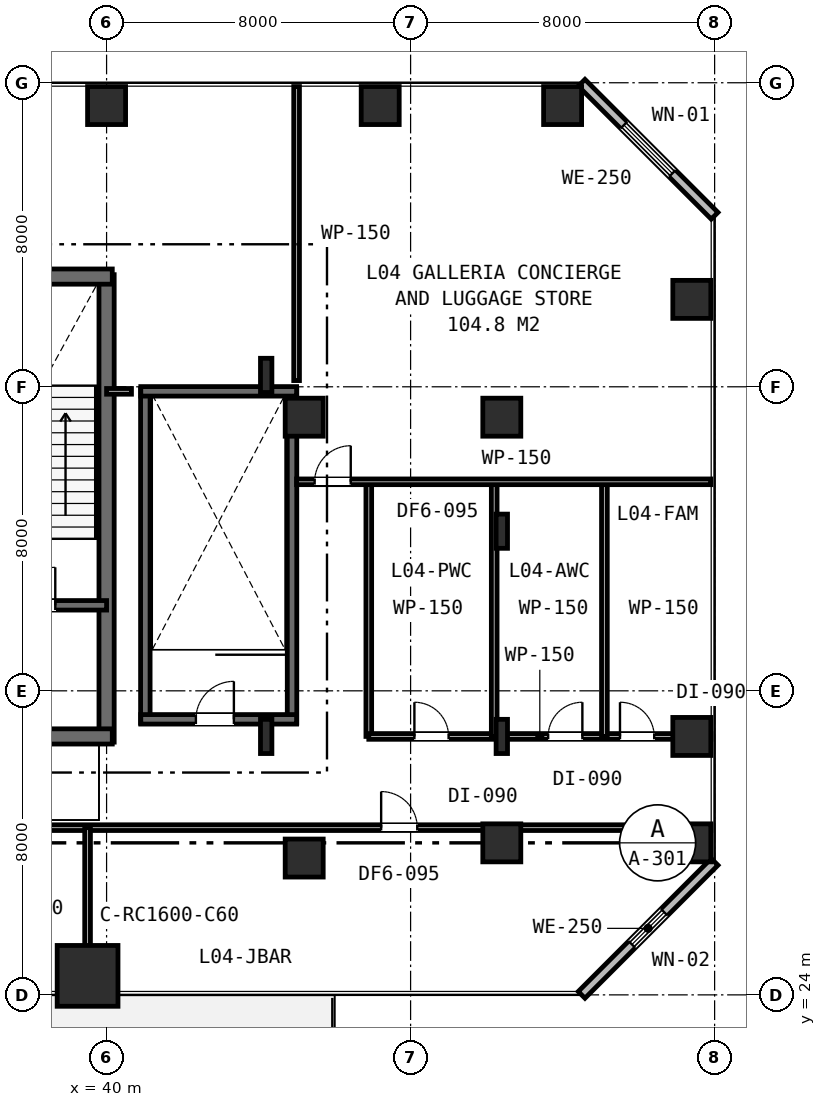
"""IFC4 building model, lengths in metres.
Left out: names, types, materials, properties, quantities, classifications, styles, units other than length and angle.
Written with IfcOpenShell. Run it as: python <this file> out.ifc"""

import sys

from ifc_helpers import new_model, si_unit, direction, frame, frame_2d, origin, origin_2d, place, context, subcontext, project, spatial, rectangle, i_section, extrude, element, fill, save


model = new_model("IFC4")
c1 = context("Model", 3, precision=1e-05, world=origin(), true_north=direction((0.0, 1.0)))
c2 = subcontext(c1, "Body", "Model", "MODEL_VIEW")
j1 = project(units=[si_unit("LENGTHUNIT", "METRE"), si_unit("PLANEANGLEUNIT", "RADIAN")], contexts=[c1])
p1 = place(None, origin())
s1 = spatial("IfcSite", under=j1, at=p1, CompositionType="ELEMENT")
p2 = place(p1, origin())
s2 = spatial("IfcBuilding", under=s1, at=p2, CompositionType="ELEMENT")
p3 = place(p2, frame((0.0, 0.0, 21.3)))
s3 = spatial("IfcBuildingStorey", under=s2, at=p3, CompositionType="ELEMENT", Elevation=21.3)
p4 = place(p3, frame((40.0, 30.65, 0.0), z_axis=(0.0, 0.0, 1.0), x_axis=(0.0, 1.0, 0.0)))
e1 = element("IfcWall", 1, at=p4, inside=s3, PredefinedType="SHEAR", context=c2, shape_type="SweptSolid", body=[
    extrude(rectangle(XDim=12.3, YDim=0.4, at=frame_2d((6.15, 0.0))), origin(), (0.0, 0.0, 1.0), 4.5),
])
p5 = place(p3, frame((15.85, 42.9, 0.0), z_axis=(0.0, 0.0, 1.0), x_axis=(1.0, 0.0, 0.0)))
e2 = element("IfcWall", 2, at=p5, inside=s3, PredefinedType="SHEAR", context=c2, shape_type="SweptSolid", body=[
    extrude(rectangle(XDim=24.3, YDim=0.4, at=frame_2d((12.15, 0.0))), origin(), (0.0, 0.0, 1.0), 4.5),
])
p6 = place(p3, frame((28.95, 30.8, 0.0), z_axis=(0.0, 0.0, 1.0), x_axis=(1.0, 0.0, 0.0)))
e3 = element("IfcWall", 3, at=p6, inside=s3, PredefinedType="SHEAR", context=c2, shape_type="SweptSolid", body=[
    extrude(rectangle(XDim=11.2, YDim=0.4, at=frame_2d((5.6, 0.0))), origin(), (0.0, 0.0, 1.0), 4.5),
])
p7 = place(p6, frame((7.65, 0.0, 0.0)))
e4 = element("IfcOpeningElement", 4, at=p7, cuts=e3, PredefinedType="OPENING", context=c2, shape_type="SweptSolid", body=[
    extrude(rectangle(XDim=1.1, YDim=2.15, at=frame_2d((0.55, 1.075))), frame((0.0, 0.21, 0.0), z_axis=(0.0, -1.0, 0.0), x_axis=(1.0, 0.0, 0.0)), (0.0, 0.0, 1.0), 0.42),
])
p8 = place(p3, frame((33.95, 34.25, 0.0), z_axis=(0.0, 0.0, 1.0), x_axis=(1.0, 0.0, 0.0)))
e5 = element("IfcWall", 5, at=p8, inside=s3, PredefinedType="SHEAR", context=c2, shape_type="SweptSolid", body=[
    extrude(rectangle(XDim=6.05, YDim=0.25, at=frame_2d((3.025, 0.0))), origin(), (0.0, 0.0, 1.0), 4.5),
])
p9 = place(p8, frame((3.7, 0.0, 0.0)))
e6 = element("IfcOpeningElement", 6, at=p9, cuts=e5, PredefinedType="OPENING", context=c2, shape_type="SweptSolid", body=[
    extrude(rectangle(XDim=1.0, YDim=2.15, at=frame_2d((0.5, 1.075))), frame((0.0, 0.135, 0.0), z_axis=(0.0, -1.0, 0.0), x_axis=(1.0, 0.0, 0.0)), (0.0, 0.0, 1.0), 0.27),
])
p10 = place(p8, frame((0.55, 0.0, 0.0)))
e7 = element("IfcOpeningElement", 7, at=p10, cuts=e5, PredefinedType="OPENING", context=c2, shape_type="SweptSolid", body=[
    extrude(rectangle(XDim=1.1, YDim=2.15, at=frame_2d((0.55, 1.075))), frame((0.0, 0.135, 0.0), z_axis=(0.0, -1.0, 0.0), x_axis=(1.0, 0.0, 0.0)), (0.0, 0.0, 1.0), 0.27),
])
for number, where, z_axis, x_axis in (
    (8, (41.02, 31.15, 0.0), (0.0, 0.0, 1.0), (0.0, 1.0, 0.0)),
    (9, (44.88, 31.15, 0.0), (0.0, 0.0, 1.0), (0.0, 1.0, 0.0)),
):
    element("IfcWall", number, at=place(p3, frame(where, z_axis=z_axis, x_axis=x_axis)), inside=s3, PredefinedType="SHEAR", context=c2, shape_type="SweptSolid", body=[
        extrude(rectangle(XDim=8.8, YDim=0.25, at=frame_2d((4.4, 0.0))), origin(), (0.0, 0.0, 1.0), 4.5),
    ])
p11 = place(p3, frame((40.9, 39.88, 0.0), z_axis=(0.0, 0.0, 1.0), x_axis=(1.0, 0.0, 0.0)))
e10 = element("IfcWall", 10, at=p11, inside=s3, PredefinedType="SHEAR", context=c2, shape_type="SweptSolid", body=[
    extrude(rectangle(XDim=4.1, YDim=0.25, at=frame_2d((2.05, 0.0))), origin(), (0.0, 0.0, 1.0), 4.5),
])
p12 = place(p3, frame((40.9, 31.25, 0.0), z_axis=(0.0, 0.0, 1.0), x_axis=(1.0, 0.0, 0.0)))
e11 = element("IfcWall", 11, at=p12, inside=s3, PredefinedType="SHEAR", context=c2, shape_type="SweptSolid", body=[
    extrude(rectangle(XDim=4.1, YDim=0.25, at=frame_2d((2.05, 0.0))), origin(), (0.0, 0.0, 1.0), 4.5),
])
p13 = place(p12, frame((1.45, 0.0, 0.0)))
e12 = element("IfcOpeningElement", 12, at=p13, cuts=e11, PredefinedType="OPENING", context=c2, shape_type="SweptSolid", body=[
    extrude(rectangle(XDim=1.0, YDim=2.15, at=frame_2d((0.5, 1.075))), frame((0.0, 0.135, 0.0), z_axis=(0.0, -1.0, 0.0), x_axis=(1.0, 0.0, 0.0)), (0.0, 0.0, 1.0), 0.27),
])
p14 = place(p3, frame((39.5, 24.5, 0.0), z_axis=(0.0, 0.0, 1.0), x_axis=(1.0, 0.0, 0.0)))
e13 = element("IfcColumn", 13, at=p14, inside=s3, PredefinedType="COLUMN", context=c2, shape_type="SweptSolid", body=[
    extrude(rectangle(XDim=1.6, YDim=1.6, at=origin_2d()), origin(), (0.0, 0.0, 1.0), 4.5),
])
for number, where, z_axis, x_axis in (
    (14, (45.2, 27.6, 0.0), (0.0, 0.0, 1.0), (1.0, 0.0, 0.0)),
    (15, (45.2, 39.2, 0.0), (0.0, 0.0, 1.0), (1.0, 0.0, 0.0)),
    (16, (40.0, 47.4, 0.0), (0.0, 0.0, 1.0), (1.0, 0.0, 0.0)),
    (17, (47.2, 47.4, 0.0), (0.0, 0.0, 1.0), (1.0, 0.0, 0.0)),
    (18, (50.4, 28.0, 0.0), (0.0, 0.0, 1.0), (1.0, 0.0, 0.0)),
    (19, (50.4, 39.2, 0.0), (0.0, 0.0, 1.0), (1.0, 0.0, 0.0)),
    (20, (55.4, 28.0, 0.0), (0.0, 0.0, 1.0), (1.0, 0.0, 0.0)),
    (21, (55.4, 30.8, 0.0), (0.0, 0.0, 1.0), (1.0, 0.0, 0.0)),
    (22, (55.4, 42.3, 0.0), (0.0, 0.0, 1.0), (1.0, 0.0, 0.0)),
    (23, (52.0, 47.4, 0.0), (0.0, 0.0, 1.0), (1.0, 0.0, 0.0)),
):
    element("IfcColumn", number, at=place(p3, frame(where, z_axis=z_axis, x_axis=x_axis)), inside=s3, PredefinedType="COLUMN", context=c2, shape_type="SweptSolid", body=[
        extrude(rectangle(XDim=1.0, YDim=1.0, at=origin_2d()), origin(), (0.0, 0.0, 1.0), 4.5),
    ])
for number, where, z_axis, x_axis in (
    (24, (44.2, 30.8, 0.0), (0.0, 0.0, 1.0), (1.0, 0.0, 0.0)),
    (25, (44.2, 40.3, 0.0), (0.0, 0.0, 1.0), (1.0, 0.0, 0.0)),
    (26, (50.4, 30.8, 0.0), (0.0, 0.0, 1.0), (1.0, 0.0, 0.0)),
    (27, (50.4, 36.2, 0.0), (0.0, 0.0, 1.0), (1.0, 0.0, 0.0)),
):
    element("IfcColumn", number, at=place(p3, frame(where, z_axis=z_axis, x_axis=x_axis)), inside=s3, PredefinedType="COLUMN", context=c2, shape_type="SweptSolid", body=[
        extrude(i_section(OverallWidth=0.3, OverallDepth=0.9, WebThickness=0.018, FlangeThickness=0.035, FilletRadius=0.03, at=origin_2d()), origin(), (0.0, 0.0, 1.0), 4.5),
    ])
p15 = place(p3, frame((52.5, 24.0, 0.0), z_axis=(0.0, 0.0, 1.0), x_axis=(0.707106781187, 0.707106781187, 0.0)))
e28 = element("IfcWall", 28, at=p15, inside=s3, PredefinedType="STANDARD", context=c2, shape_type="SweptSolid", body=[
    extrude(rectangle(XDim=4.95, YDim=0.25, at=frame_2d((2.475, 0.0))), origin(), (0.0, 0.0, 1.0), 4.23),
])
p16 = place(p15, frame((1.875, 0.0, 0.85)))
e29 = element("IfcOpeningElement", 29, at=p16, cuts=e28, PredefinedType="OPENING", context=c2, shape_type="SweptSolid", body=[
    extrude(rectangle(XDim=1.2, YDim=1.6, at=frame_2d((0.6, 0.8))), frame((0.0, 0.135, 0.0), z_axis=(0.0, -1.0, 0.0), x_axis=(1.0, 0.0, 0.0)), (0.0, 0.0, 1.0), 0.27),
])
p17 = place(p3, frame((56.0, 44.5, 0.0), z_axis=(0.0, 0.0, 1.0), x_axis=(-0.707106781187, 0.707106781187, 0.0)))
e30 = element("IfcWall", 30, at=p17, inside=s3, PredefinedType="STANDARD", context=c2, shape_type="SweptSolid", body=[
    extrude(rectangle(XDim=4.95, YDim=0.25, at=frame_2d((2.475, 0.0))), origin(), (0.0, 0.0, 1.0), 4.23),
])
p18 = place(p17, frame((1.575, 0.0, 0.75)))
e31 = element("IfcOpeningElement", 31, at=p18, cuts=e30, PredefinedType="OPENING", context=c2, shape_type="SweptSolid", body=[
    extrude(rectangle(XDim=1.8, YDim=1.85, at=frame_2d((0.9, 0.925))), frame((0.0, 0.135, 0.0), z_axis=(0.0, -1.0, 0.0), x_axis=(1.0, 0.0, 0.0)), (0.0, 0.0, 1.0), 0.27),
])
p19 = place(p3, frame((46.9, 30.8, 0.0), z_axis=(0.0, 0.0, 1.0), x_axis=(0.0, 1.0, 0.0)))
e32 = element("IfcWall", 32, at=p19, inside=s3, PredefinedType="PARTITIONING", context=c2, shape_type="SweptSolid", body=[
    extrude(rectangle(XDim=6.7, YDim=0.15, at=frame_2d((3.35, 0.0))), origin(), (0.0, 0.0, 1.0), 3.58),
])
p20 = place(p3, frame((46.9, 30.8, 0.0), z_axis=(0.0, 0.0, 1.0), x_axis=(1.0, 0.0, 0.0)))
e33 = element("IfcWall", 33, at=p20, inside=s3, PredefinedType="PARTITIONING", context=c2, shape_type="SweptSolid", body=[
    extrude(rectangle(XDim=9.0, YDim=0.15, at=frame_2d((4.5, 0.0))), origin(), (0.0, 0.0, 1.0), 3.58),
])
p21 = place(p20, frame((1.2, 0.0, 0.0)))
e34 = element("IfcOpeningElement", 34, at=p21, cuts=e33, PredefinedType="OPENING", context=c2, shape_type="SweptSolid", body=[
    extrude(rectangle(XDim=0.9, YDim=2.15, at=frame_2d((0.45, 1.075))), frame((0.0, 0.085, 0.0), z_axis=(0.0, -1.0, 0.0), x_axis=(1.0, 0.0, 0.0)), (0.0, 0.0, 1.0), 0.17),
])
p22 = place(p20, frame((4.72, 0.0, 0.0)))
e35 = element("IfcOpeningElement", 35, at=p22, cuts=e33, PredefinedType="OPENING", context=c2, shape_type="SweptSolid", body=[
    extrude(rectangle(XDim=0.9, YDim=2.15, at=frame_2d((0.45, 1.075))), frame((0.0, 0.085, 0.0), z_axis=(0.0, -1.0, 0.0), x_axis=(1.0, 0.0, 0.0)), (0.0, 0.0, 1.0), 0.17),
])
p23 = place(p20, frame((6.61, 0.0, 0.0)))
e36 = element("IfcOpeningElement", 36, at=p23, cuts=e33, PredefinedType="OPENING", context=c2, shape_type="SweptSolid", body=[
    extrude(rectangle(XDim=0.9, YDim=2.15, at=frame_2d((0.45, 1.075))), frame((0.0, 0.085, 0.0), z_axis=(0.0, -1.0, 0.0), x_axis=(1.0, 0.0, 0.0)), (0.0, 0.0, 1.0), 0.17),
])
for number, where, z_axis, x_axis in (
    (37, (50.2, 30.8, 0.0), (0.0, 0.0, 1.0), (0.0, 1.0, 0.0)),
    (38, (53.1, 30.8, 0.0), (0.0, 0.0, 1.0), (0.0, 1.0, 0.0)),
):
    element("IfcWall", number, at=place(p3, frame(where, z_axis=z_axis, x_axis=x_axis)), inside=s3, PredefinedType="PARTITIONING", context=c2, shape_type="SweptSolid", body=[
        extrude(rectangle(XDim=6.7, YDim=0.15, at=frame_2d((3.35, 0.0))), origin(), (0.0, 0.0, 1.0), 3.58),
    ])
p24 = place(p3, frame((45.0, 37.5, 0.0), z_axis=(0.0, 0.0, 1.0), x_axis=(1.0, 0.0, 0.0)))
e39 = element("IfcWall", 39, at=p24, inside=s3, PredefinedType="PARTITIONING", context=c2, shape_type="SweptSolid", body=[
    extrude(rectangle(XDim=10.9, YDim=0.15, at=frame_2d((5.45, 0.0))), origin(), (0.0, 0.0, 1.0), 3.58),
])
p25 = place(p24, frame((0.475, 0.0, 0.0)))
e40 = element("IfcOpeningElement", 40, at=p25, cuts=e39, PredefinedType="OPENING", context=c2, shape_type="SweptSolid", body=[
    extrude(rectangle(XDim=0.95, YDim=2.15, at=frame_2d((0.475, 1.075))), frame((0.0, 0.085, 0.0), z_axis=(0.0, -1.0, 0.0), x_axis=(1.0, 0.0, 0.0)), (0.0, 0.0, 1.0), 0.17),
])
p26 = place(p3, frame((45.0, 40.163, 0.0), z_axis=(0.0, 0.0, 1.0), x_axis=(0.0, 1.0, 0.0)))
e41 = element("IfcWall", 41, at=p26, inside=s3, PredefinedType="PARTITIONING", context=c2, shape_type="SweptSolid", body=[
    extrude(rectangle(XDim=7.737, YDim=0.15, at=frame_2d((3.868, 0.0))), origin(), (0.0, 0.0, 1.0), 3.77),
])
p27 = place(p3, frame((40.0, 39.88, 0.0), z_axis=(0.0, 0.0, 1.0), x_axis=(1.0, 0.0, 0.0)))
e42 = element("IfcWall", 42, at=p27, inside=s3, PredefinedType="PARTITIONING", context=c2, shape_type="SweptSolid", body=[
    extrude(rectangle(XDim=0.655, YDim=0.15, at=frame_2d((0.328, 0.0))), origin(), (0.0, 0.0, 1.0), 4.23),
])
p28 = place(p3, frame((13.7, 28.4, 0.0), z_axis=(0.0, 0.0, 1.0), x_axis=(1.0, 0.0, 0.0)))
e43 = element("IfcWall", 43, at=p28, inside=s3, PredefinedType="PARTITIONING", context=c2, shape_type="SweptSolid", body=[
    extrude(rectangle(XDim=42.2, YDim=0.15, at=frame_2d((21.1, 0.0))), origin(), (0.0, 0.0, 1.0), 3.58),
])
p29 = place(p28, frame((17.15, 0.0, 0.0)))
e44 = element("IfcOpeningElement", 44, at=p29, cuts=e43, PredefinedType="OPENING", context=c2, shape_type="SweptSolid", body=[
    extrude(rectangle(XDim=1.8, YDim=2.15, at=frame_2d((0.9, 1.075))), frame((0.0, 0.085, 0.0), z_axis=(0.0, -1.0, 0.0), x_axis=(1.0, 0.0, 0.0)), (0.0, 0.0, 1.0), 0.17),
])
p30 = place(p28, frame((33.525, 0.0, 0.0)))
e45 = element("IfcOpeningElement", 45, at=p30, cuts=e43, PredefinedType="OPENING", context=c2, shape_type="SweptSolid", body=[
    extrude(rectangle(XDim=0.95, YDim=2.15, at=frame_2d((0.475, 1.075))), frame((0.0, 0.085, 0.0), z_axis=(0.0, -1.0, 0.0), x_axis=(1.0, 0.0, 0.0)), (0.0, 0.0, 1.0), 0.17),
])
p31 = place(p3, frame((39.5, 24.1, 0.0), z_axis=(0.0, 0.0, 1.0), x_axis=(0.0, 1.0, 0.0)))
e46 = element("IfcWall", 46, at=p31, inside=s3, PredefinedType="PARTITIONING", context=c2, shape_type="SweptSolid", body=[
    extrude(rectangle(XDim=4.3, YDim=0.15, at=frame_2d((2.15, 0.0))), origin(), (0.0, 0.0, 1.0), 3.58),
])
p32 = place(p16, origin())
e47 = element("IfcWindow", 47, at=p32, inside=s3, PartitioningType="SINGLE_PANEL", PredefinedType="WINDOW", context=c2, shape_type="SweptSolid", body=[
    extrude(rectangle(XDim=1.2, YDim=1.6, at=frame_2d((0.6, 0.8))), frame((0.0, 0.03, 0.0), z_axis=(0.0, -1.0, 0.0), x_axis=(1.0, 0.0, 0.0)), (0.0, 0.0, 1.0), 0.06),
])
fill(e29, e47)
p33 = place(p18, origin())
e48 = element("IfcWindow", 48, at=p33, inside=s3, PartitioningType="SINGLE_PANEL", PredefinedType="WINDOW", context=c2, shape_type="SweptSolid", body=[
    extrude(rectangle(XDim=1.8, YDim=1.85, at=frame_2d((0.9, 0.925))), frame((0.0, 0.03, 0.0), z_axis=(0.0, -1.0, 0.0), x_axis=(1.0, 0.0, 0.0)), (0.0, 0.0, 1.0), 0.06),
])
fill(e31, e48)
p34 = place(p9, origin())
e49 = element("IfcDoor", 49, at=p34, inside=s3, OperationType="SINGLE_SWING_RIGHT", PredefinedType="DOOR", context=c2, shape_type="SweptSolid", body=[
    extrude(rectangle(XDim=1.0, YDim=2.15, at=frame_2d((0.5, 1.075))), frame((0.0, 0.025, 0.0), z_axis=(0.0, -1.0, 0.0), x_axis=(1.0, 0.0, 0.0)), (0.0, 0.0, 1.0), 0.05),
])
fill(e6, e49)
p35 = place(p13, origin())
e50 = element("IfcDoor", 50, at=p35, inside=s3, OperationType="SINGLE_SWING_RIGHT", PredefinedType="DOOR", context=c2, shape_type="SweptSolid", body=[
    extrude(rectangle(XDim=1.0, YDim=2.15, at=frame_2d((0.5, 1.075))), frame((0.0, 0.025, 0.0), z_axis=(0.0, -1.0, 0.0), x_axis=(1.0, 0.0, 0.0)), (0.0, 0.0, 1.0), 0.05),
])
fill(e12, e50)
p36 = place(p21, origin())
e51 = element("IfcDoor", 51, at=p36, inside=s3, OperationType="SINGLE_SWING_LEFT", PredefinedType="DOOR", context=c2, shape_type="SweptSolid", body=[
    extrude(rectangle(XDim=0.9, YDim=2.15, at=frame_2d((0.45, 1.075))), frame((0.0, 0.025, 0.0), z_axis=(0.0, -1.0, 0.0), x_axis=(1.0, 0.0, 0.0)), (0.0, 0.0, 1.0), 0.05),
])
fill(e34, e51)
p37 = place(p22, origin())
e52 = element("IfcDoor", 52, at=p37, inside=s3, OperationType="SINGLE_SWING_RIGHT", PredefinedType="DOOR", context=c2, shape_type="SweptSolid", body=[
    extrude(rectangle(XDim=0.9, YDim=2.15, at=frame_2d((0.45, 1.075))), frame((0.0, 0.025, 0.0), z_axis=(0.0, -1.0, 0.0), x_axis=(1.0, 0.0, 0.0)), (0.0, 0.0, 1.0), 0.05),
])
fill(e35, e52)
p38 = place(p23, origin())
e53 = element("IfcDoor", 53, at=p38, inside=s3, OperationType="SINGLE_SWING_LEFT", PredefinedType="DOOR", context=c2, shape_type="SweptSolid", body=[
    extrude(rectangle(XDim=0.9, YDim=2.15, at=frame_2d((0.45, 1.075))), frame((0.0, 0.025, 0.0), z_axis=(0.0, -1.0, 0.0), x_axis=(1.0, 0.0, 0.0)), (0.0, 0.0, 1.0), 0.05),
])
fill(e36, e53)
p39 = place(p25, origin())
e54 = element("IfcDoor", 54, at=p39, inside=s3, OperationType="SINGLE_SWING_RIGHT", PredefinedType="DOOR", context=c2, shape_type="SweptSolid", body=[
    extrude(rectangle(XDim=0.95, YDim=2.15, at=frame_2d((0.475, 1.075))), frame((0.0, 0.025, 0.0), z_axis=(0.0, -1.0, 0.0), x_axis=(1.0, 0.0, 0.0)), (0.0, 0.0, 1.0), 0.05),
])
fill(e40, e54)
p40 = place(p30, origin())
e55 = element("IfcDoor", 55, at=p40, inside=s3, OperationType="SINGLE_SWING_LEFT", PredefinedType="DOOR", context=c2, shape_type="SweptSolid", body=[
    extrude(rectangle(XDim=0.95, YDim=2.15, at=frame_2d((0.475, 1.075))), frame((0.0, 0.025, 0.0), z_axis=(0.0, -1.0, 0.0), x_axis=(1.0, 0.0, 0.0)), (0.0, 0.0, 1.0), 0.05),
])
fill(e45, e55)
save(model, sys.argv[1])
